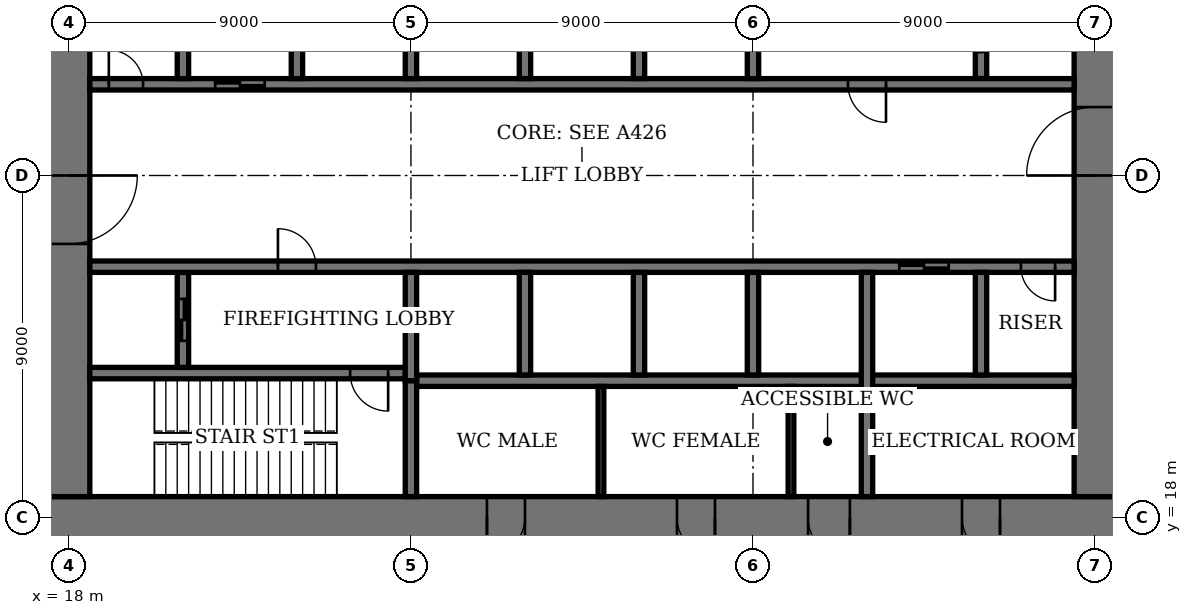
"""IFC4 building model, lengths in metres.
Left out: names, types, materials, properties, quantities, classifications, styles, units other than length and angle.
Written with IfcOpenShell. Run it as: python <this file> out.ifc"""

import sys

from ifc_helpers import new_model, si_unit, direction, frame, frame_2d, origin, place, context, subcontext, project, spatial, rectangle, extrude, element, fill, save


model = new_model("IFC4")
c1 = context("Model", 3, precision=1e-05, world=origin(), true_north=direction((0.0, 1.0)))
c2 = subcontext(c1, "Body", "Model", "MODEL_VIEW")
j1 = project(units=[si_unit("LENGTHUNIT", "METRE"), si_unit("PLANEANGLEUNIT", "RADIAN")], contexts=[c1])
p1 = place(None, origin())
s1 = spatial("IfcSite", under=j1, at=p1, CompositionType="ELEMENT")
p2 = place(p1, origin())
s2 = spatial("IfcBuilding", under=s1, at=p2, CompositionType="ELEMENT")
p3 = place(p2, frame((0.0, 0.0, 80.0)))
s3 = spatial("IfcBuildingStorey", under=s2, at=p3, CompositionType="ELEMENT", Elevation=80.0)
p4 = place(p3, frame((17.45, 18.0, 0.0), z_axis=(0.0, 0.0, 1.0), x_axis=(1.0, 0.0, 0.0)))
e1 = element("IfcWall", 1, at=p4, inside=s3, PredefinedType="SHEAR", context=c2, shape_type="SweptSolid", body=[
    extrude(rectangle(XDim=28.1, YDim=1.1, at=frame_2d((14.05, 0.0))), origin(), (0.0, 0.0, 1.0), 5.0),
])
p5 = place(p4, frame((11.55, 0.0, 0.0)))
e2 = element("IfcOpeningElement", 2, at=p5, cuts=e1, PredefinedType="OPENING", context=c2, shape_type="SweptSolid", body=[
    extrude(rectangle(XDim=1.0, YDim=2.4, at=frame_2d((0.5, 1.2))), frame((0.0, 0.56, 0.0), z_axis=(0.0, -1.0, 0.0), x_axis=(1.0, 0.0, 0.0)), (0.0, 0.0, 1.0), 1.12),
])
p6 = place(p4, frame((16.55, 0.0, 0.0)))
e3 = element("IfcOpeningElement", 3, at=p6, cuts=e1, PredefinedType="OPENING", context=c2, shape_type="SweptSolid", body=[
    extrude(rectangle(XDim=1.0, YDim=2.4, at=frame_2d((0.5, 1.2))), frame((0.0, 0.56, 0.0), z_axis=(0.0, -1.0, 0.0), x_axis=(1.0, 0.0, 0.0)), (0.0, 0.0, 1.0), 1.12),
])
p7 = place(p4, frame((20.0, 0.0, 0.0)))
e4 = element("IfcOpeningElement", 4, at=p7, cuts=e1, PredefinedType="OPENING", context=c2, shape_type="SweptSolid", body=[
    extrude(rectangle(XDim=1.1, YDim=2.4, at=frame_2d((0.55, 1.2))), frame((0.0, 0.56, 0.0), z_axis=(0.0, -1.0, 0.0), x_axis=(1.0, 0.0, 0.0)), (0.0, 0.0, 1.0), 1.12),
])
p8 = place(p4, frame((24.05, 0.0, 0.0)))
e5 = element("IfcOpeningElement", 5, at=p8, cuts=e1, PredefinedType="OPENING", context=c2, shape_type="SweptSolid", body=[
    extrude(rectangle(XDim=1.0, YDim=2.4, at=frame_2d((0.5, 1.2))), frame((0.0, 0.56, 0.0), z_axis=(0.0, -1.0, 0.0), x_axis=(1.0, 0.0, 0.0)), (0.0, 0.0, 1.0), 1.12),
])
p9 = place(p3, frame((18.0, 35.45, 0.0), z_axis=(0.0, 0.0, 1.0), x_axis=(0.0, -1.0, 0.0)))
e6 = element("IfcWall", 6, at=p9, inside=s3, PredefinedType="SHEAR", context=c2, shape_type="SweptSolid", body=[
    extrude(rectangle(XDim=16.9, YDim=1.1, at=frame_2d((8.45, 0.0))), origin(), (0.0, 0.0, 1.0), 5.0),
])
p10 = place(p9, frame((8.45, 0.0, 0.0)))
e7 = element("IfcOpeningElement", 7, at=p10, cuts=e6, PredefinedType="OPENING", context=c2, shape_type="SweptSolid", body=[
    extrude(rectangle(XDim=1.8, YDim=2.4, at=frame_2d((0.9, 1.2))), frame((0.0, 0.56, 0.0), z_axis=(0.0, -1.0, 0.0), x_axis=(1.0, 0.0, 0.0)), (0.0, 0.0, 1.0), 1.12),
])
p11 = place(p3, frame((45.0, 18.55, 0.0), z_axis=(0.0, 0.0, 1.0), x_axis=(0.0, 1.0, 0.0)))
e8 = element("IfcWall", 8, at=p11, inside=s3, PredefinedType="SHEAR", context=c2, shape_type="SweptSolid", body=[
    extrude(rectangle(XDim=16.9, YDim=1.1, at=frame_2d((8.45, 0.0))), origin(), (0.0, 0.0, 1.0), 5.0),
])
p12 = place(p11, frame((8.45, 0.0, 0.0)))
e9 = element("IfcOpeningElement", 9, at=p12, cuts=e8, PredefinedType="OPENING", context=c2, shape_type="SweptSolid", body=[
    extrude(rectangle(XDim=1.8, YDim=2.4, at=frame_2d((0.9, 1.2))), frame((0.0, 0.56, 0.0), z_axis=(0.0, -1.0, 0.0), x_axis=(1.0, 0.0, 0.0)), (0.0, 0.0, 1.0), 1.12),
])
p13 = place(p3, frame((18.55, 21.8, 0.0), z_axis=(0.0, 0.0, 1.0), x_axis=(1.0, 0.0, 0.0)))
e10 = element("IfcWall", 10, at=p13, inside=s3, PredefinedType="SHEAR", context=c2, shape_type="SweptSolid", body=[
    extrude(rectangle(XDim=8.3, YDim=0.3, at=frame_2d((4.15, 0.0))), origin(), (0.0, 0.0, 1.0), 5.0),
])
p14 = place(p13, frame((6.85, 0.0, 0.0)))
e11 = element("IfcOpeningElement", 11, at=p14, cuts=e10, PredefinedType="OPENING", context=c2, shape_type="SweptSolid", body=[
    extrude(rectangle(XDim=1.0, YDim=2.4, at=frame_2d((0.5, 1.2))), frame((0.0, 0.16, 0.0), z_axis=(0.0, -1.0, 0.0), x_axis=(1.0, 0.0, 0.0)), (0.0, 0.0, 1.0), 0.32),
])
p15 = place(p3, frame((27.0, 18.55, 0.0), z_axis=(0.0, 0.0, 1.0), x_axis=(0.0, 1.0, 0.0)))
e12 = element("IfcWall", 12, at=p15, inside=s3, PredefinedType="SHEAR", context=c2, shape_type="SweptSolid", body=[
    extrude(rectangle(XDim=3.05, YDim=0.3, at=frame_2d((1.525, 0.0))), origin(), (0.0, 0.0, 1.0), 5.0),
])
p16 = place(p3, frame((21.0, 21.95, 0.0), z_axis=(0.0, 0.0, 1.0), x_axis=(0.0, 1.0, 0.0)))
e13 = element("IfcWall", 13, at=p16, inside=s3, PredefinedType="SHEAR", context=c2, shape_type="SweptSolid", body=[
    extrude(rectangle(XDim=2.5, YDim=0.3, at=frame_2d((1.25, 0.0))), origin(), (0.0, 0.0, 1.0), 5.0),
])
p17 = place(p16, frame((0.7, 0.0, 0.0)))
e14 = element("IfcOpeningElement", 14, at=p17, cuts=e13, PredefinedType="OPENING", context=c2, shape_type="SweptSolid", body=[
    extrude(rectangle(XDim=1.1, YDim=2.4, at=frame_2d((0.55, 1.2))), frame((0.0, 0.16, 0.0), z_axis=(0.0, -1.0, 0.0), x_axis=(1.0, 0.0, 0.0)), (0.0, 0.0, 1.0), 0.32),
])
p18 = place(p3, frame((42.0, 29.55, 0.0), z_axis=(0.0, 0.0, 1.0), x_axis=(0.0, 1.0, 0.0)))
e15 = element("IfcWall", 15, at=p18, inside=s3, PredefinedType="SHEAR", context=c2, shape_type="SweptSolid", body=[
    extrude(rectangle(XDim=2.5, YDim=0.3, at=frame_2d((1.25, 0.0))), origin(), (0.0, 0.0, 1.0), 5.0),
])
p19 = place(p18, frame((0.7, 0.0, 0.0)))
e16 = element("IfcOpeningElement", 16, at=p19, cuts=e15, PredefinedType="OPENING", context=c2, shape_type="SweptSolid", body=[
    extrude(rectangle(XDim=1.1, YDim=2.4, at=frame_2d((0.55, 1.2))), frame((0.0, 0.16, 0.0), z_axis=(0.0, -1.0, 0.0), x_axis=(1.0, 0.0, 0.0)), (0.0, 0.0, 1.0), 0.32),
])
p20 = place(p3, frame((18.55, 24.6, 0.0), z_axis=(0.0, 0.0, 1.0), x_axis=(1.0, 0.0, 0.0)))
e17 = element("IfcWall", 17, at=p20, inside=s3, PredefinedType="SHEAR", context=c2, shape_type="SweptSolid", body=[
    extrude(rectangle(XDim=25.9, YDim=0.3, at=frame_2d((12.95, 0.0))), origin(), (0.0, 0.0, 1.0), 5.0),
])
p21 = place(p20, frame((4.95, 0.0, 0.0)))
e18 = element("IfcOpeningElement", 18, at=p21, cuts=e17, PredefinedType="OPENING", context=c2, shape_type="SweptSolid", body=[
    extrude(rectangle(XDim=1.0, YDim=2.4, at=frame_2d((0.5, 1.2))), frame((0.0, 0.16, 0.0), z_axis=(0.0, -1.0, 0.0), x_axis=(1.0, 0.0, 0.0)), (0.0, 0.0, 1.0), 0.32),
])
p22 = place(p20, frame((24.5, 0.0, 0.0)))
e19 = element("IfcOpeningElement", 19, at=p22, cuts=e17, PredefinedType="OPENING", context=c2, shape_type="SweptSolid", body=[
    extrude(rectangle(XDim=0.9, YDim=2.1, at=frame_2d((0.45, 1.05))), frame((0.0, 0.16, 0.0), z_axis=(0.0, -1.0, 0.0), x_axis=(1.0, 0.0, 0.0)), (0.0, 0.0, 1.0), 0.32),
])
p23 = place(p20, frame((21.3, 0.0, 0.0)))
e20 = element("IfcOpeningElement", 20, at=p23, cuts=e17, PredefinedType="OPENING", context=c2, shape_type="SweptSolid", body=[
    extrude(rectangle(XDim=1.3, YDim=2.4, at=frame_2d((0.65, 1.2))), frame((0.0, 0.16, 0.0), z_axis=(0.0, -1.0, 0.0), x_axis=(1.0, 0.0, 0.0)), (0.0, 0.0, 1.0), 0.32),
])
p24 = place(p3, frame((18.55, 29.4, 0.0), z_axis=(0.0, 0.0, 1.0), x_axis=(1.0, 0.0, 0.0)))
e21 = element("IfcWall", 21, at=p24, inside=s3, PredefinedType="SHEAR", context=c2, shape_type="SweptSolid", body=[
    extrude(rectangle(XDim=25.9, YDim=0.3, at=frame_2d((12.95, 0.0))), origin(), (0.0, 0.0, 1.0), 5.0),
])
p25 = place(p24, frame((19.95, 0.0, 0.0)))
e22 = element("IfcOpeningElement", 22, at=p25, cuts=e21, PredefinedType="OPENING", context=c2, shape_type="SweptSolid", body=[
    extrude(rectangle(XDim=1.0, YDim=2.4, at=frame_2d((0.5, 1.2))), frame((0.0, 0.16, 0.0), z_axis=(0.0, -1.0, 0.0), x_axis=(1.0, 0.0, 0.0)), (0.0, 0.0, 1.0), 0.32),
])
p26 = place(p24, frame((0.5, 0.0, 0.0)))
e23 = element("IfcOpeningElement", 23, at=p26, cuts=e21, PredefinedType="OPENING", context=c2, shape_type="SweptSolid", body=[
    extrude(rectangle(XDim=0.9, YDim=2.1, at=frame_2d((0.45, 1.05))), frame((0.0, 0.16, 0.0), z_axis=(0.0, -1.0, 0.0), x_axis=(1.0, 0.0, 0.0)), (0.0, 0.0, 1.0), 0.32),
])
p27 = place(p24, frame((3.3, 0.0, 0.0)))
e24 = element("IfcOpeningElement", 24, at=p27, cuts=e21, PredefinedType="OPENING", context=c2, shape_type="SweptSolid", body=[
    extrude(rectangle(XDim=1.3, YDim=2.4, at=frame_2d((0.65, 1.2))), frame((0.0, 0.16, 0.0), z_axis=(0.0, -1.0, 0.0), x_axis=(1.0, 0.0, 0.0)), (0.0, 0.0, 1.0), 0.32),
])
p28 = place(p3, frame((27.15, 21.6, 0.0), z_axis=(0.0, 0.0, 1.0), x_axis=(1.0, 0.0, 0.0)))
e25 = element("IfcWall", 25, at=p28, inside=s3, PredefinedType="SHEAR", context=c2, shape_type="SweptSolid", body=[
    extrude(rectangle(XDim=17.3, YDim=0.3, at=frame_2d((8.65, 0.0))), origin(), (0.0, 0.0, 1.0), 5.0),
])
for number, where, z_axis, x_axis in (
    (26, (30.0, 21.75, 0.0), (0.0, 0.0, 1.0), (0.0, 1.0, 0.0)),
    (27, (33.0, 29.55, 0.0), (0.0, 0.0, 1.0), (0.0, 1.0, 0.0)),
    (28, (33.0, 21.75, 0.0), (0.0, 0.0, 1.0), (0.0, 1.0, 0.0)),
    (29, (30.0, 29.55, 0.0), (0.0, 0.0, 1.0), (0.0, 1.0, 0.0)),
    (30, (36.0, 21.75, 0.0), (0.0, 0.0, 1.0), (0.0, 1.0, 0.0)),
    (31, (27.0, 29.55, 0.0), (0.0, 0.0, 1.0), (0.0, 1.0, 0.0)),
):
    element("IfcWall", number, at=place(p3, frame(where, z_axis=z_axis, x_axis=x_axis)), inside=s3, PredefinedType="SHEAR", context=c2, shape_type="SweptSolid", body=[
        extrude(rectangle(XDim=2.7, YDim=0.3, at=frame_2d((1.35, 0.0))), origin(), (0.0, 0.0, 1.0), 5.0),
    ])
for number, where, z_axis, x_axis in (
    (32, (39.0, 18.55, 0.0), (0.0, 0.0, 1.0), (0.0, 1.0, 0.0)),
    (33, (24.0, 29.55, 0.0), (0.0, 0.0, 1.0), (0.0, 1.0, 0.0)),
):
    element("IfcWall", number, at=place(p3, frame(where, z_axis=z_axis, x_axis=x_axis)), inside=s3, PredefinedType="SHEAR", context=c2, shape_type="SweptSolid", body=[
        extrude(rectangle(XDim=5.9, YDim=0.3, at=frame_2d((2.95, 0.0))), origin(), (0.0, 0.0, 1.0), 5.0),
    ])
for number, where, z_axis, x_axis in (
    (34, (42.0, 21.75, 0.0), (0.0, 0.0, 1.0), (0.0, 1.0, 0.0)),
    (35, (21.0, 29.55, 0.0), (0.0, 0.0, 1.0), (0.0, 1.0, 0.0)),
):
    element("IfcWall", number, at=place(p3, frame(where, z_axis=z_axis, x_axis=x_axis)), inside=s3, PredefinedType="SHEAR", context=c2, shape_type="SweptSolid", body=[
        extrude(rectangle(XDim=2.7, YDim=0.3, at=frame_2d((1.35, 0.0))), origin(), (0.0, 0.0, 1.0), 5.0),
    ])
for number, where, z_axis, x_axis in (
    (36, (27.0, 21.6, 0.0), (0.0, 0.0, 1.0), (0.0, 1.0, 0.0)),
    (37, (36.0, 29.55, 0.0), (0.0, 0.0, 1.0), (0.0, 1.0, 0.0)),
):
    element("IfcWall", number, at=place(p3, frame(where, z_axis=z_axis, x_axis=x_axis)), inside=s3, PredefinedType="SHEAR", context=c2, shape_type="SweptSolid", body=[
        extrude(rectangle(XDim=2.85, YDim=0.3, at=frame_2d((1.425, 0.0))), origin(), (0.0, 0.0, 1.0), 5.0),
    ])
for number, where, z_axis, x_axis in (
    (38, (32.0, 18.55, 0.0), (0.0, 0.0, 1.0), (0.0, 1.0, 0.0)),
    (39, (37.0, 18.55, 0.0), (0.0, 0.0, 1.0), (0.0, 1.0, 0.0)),
):
    element("IfcWall", number, at=place(p3, frame(where, z_axis=z_axis, x_axis=x_axis)), inside=s3, PredefinedType="PARTITIONING", context=c2, shape_type="SweptSolid", body=[
        extrude(rectangle(XDim=2.9, YDim=0.15, at=frame_2d((1.45, 0.0))), origin(), (0.0, 0.0, 1.0), 4.6),
    ])
p29 = place(p10, origin())
e40 = element("IfcDoor", 40, at=p29, inside=s3, OperationType="DOUBLE_DOOR_DOUBLE_SWING", PredefinedType="DOOR", context=c2, shape_type="SweptSolid", body=[
    extrude(rectangle(XDim=1.8, YDim=2.4, at=frame_2d((0.9, 1.2))), frame((0.0, 0.03, 0.0), z_axis=(0.0, -1.0, 0.0), x_axis=(1.0, 0.0, 0.0)), (0.0, 0.0, 1.0), 0.06),
    extrude(rectangle(XDim=0.04, YDim=2.4, at=frame_2d((0.02, 1.2))), frame((0.0, 0.55, 0.0), z_axis=(0.0, -1.0, 0.0), x_axis=(1.0, 0.0, 0.0)), (0.0, 0.0, 1.0), 1.1),
    extrude(rectangle(XDim=0.04, YDim=2.4, at=frame_2d((1.78, 1.2))), frame((0.0, 0.55, 0.0), z_axis=(0.0, -1.0, 0.0), x_axis=(1.0, 0.0, 0.0)), (0.0, 0.0, 1.0), 1.1),
    extrude(rectangle(XDim=1.8, YDim=0.04, at=frame_2d((0.9, 2.38))), frame((0.0, 0.55, 0.0), z_axis=(0.0, -1.0, 0.0), x_axis=(1.0, 0.0, 0.0)), (0.0, 0.0, 1.0), 1.1),
])
fill(e7, e40)
p30 = place(p12, origin())
e41 = element("IfcDoor", 41, at=p30, inside=s3, OperationType="DOUBLE_DOOR_DOUBLE_SWING", PredefinedType="DOOR", context=c2, shape_type="SweptSolid", body=[
    extrude(rectangle(XDim=1.8, YDim=2.4, at=frame_2d((0.9, 1.2))), frame((0.0, 0.03, 0.0), z_axis=(0.0, -1.0, 0.0), x_axis=(1.0, 0.0, 0.0)), (0.0, 0.0, 1.0), 0.06),
    extrude(rectangle(XDim=0.04, YDim=2.4, at=frame_2d((0.02, 1.2))), frame((0.0, 0.55, 0.0), z_axis=(0.0, -1.0, 0.0), x_axis=(1.0, 0.0, 0.0)), (0.0, 0.0, 1.0), 1.1),
    extrude(rectangle(XDim=0.04, YDim=2.4, at=frame_2d((1.78, 1.2))), frame((0.0, 0.55, 0.0), z_axis=(0.0, -1.0, 0.0), x_axis=(1.0, 0.0, 0.0)), (0.0, 0.0, 1.0), 1.1),
    extrude(rectangle(XDim=1.8, YDim=0.04, at=frame_2d((0.9, 2.38))), frame((0.0, 0.55, 0.0), z_axis=(0.0, -1.0, 0.0), x_axis=(1.0, 0.0, 0.0)), (0.0, 0.0, 1.0), 1.1),
])
fill(e9, e41)
p31 = place(p5, origin())
e42 = element("IfcDoor", 42, at=p31, inside=s3, OperationType="SINGLE_SWING_LEFT", PredefinedType="DOOR", context=c2, shape_type="SweptSolid", body=[
    extrude(rectangle(XDim=1.0, YDim=2.4, at=frame_2d((0.5, 1.2))), frame((0.0, 0.025, 0.0), z_axis=(0.0, -1.0, 0.0), x_axis=(1.0, 0.0, 0.0)), (0.0, 0.0, 1.0), 0.05),
    extrude(rectangle(XDim=0.04, YDim=2.4, at=frame_2d((0.02, 1.2))), frame((0.0, 0.4, 0.0), z_axis=(0.0, -1.0, 0.0), x_axis=(1.0, 0.0, 0.0)), (0.0, 0.0, 1.0), 0.8),
    extrude(rectangle(XDim=0.04, YDim=2.4, at=frame_2d((0.98, 1.2))), frame((0.0, 0.4, 0.0), z_axis=(0.0, -1.0, 0.0), x_axis=(1.0, 0.0, 0.0)), (0.0, 0.0, 1.0), 0.8),
    extrude(rectangle(XDim=1.0, YDim=0.04, at=frame_2d((0.5, 2.38))), frame((0.0, 0.4, 0.0), z_axis=(0.0, -1.0, 0.0), x_axis=(1.0, 0.0, 0.0)), (0.0, 0.0, 1.0), 0.8),
])
fill(e2, e42)
p32 = place(p6, origin())
e43 = element("IfcDoor", 43, at=p32, inside=s3, OperationType="SINGLE_SWING_RIGHT", PredefinedType="DOOR", context=c2, shape_type="SweptSolid", body=[
    extrude(rectangle(XDim=1.0, YDim=2.4, at=frame_2d((0.5, 1.2))), frame((0.0, 0.025, 0.0), z_axis=(0.0, -1.0, 0.0), x_axis=(1.0, 0.0, 0.0)), (0.0, 0.0, 1.0), 0.05),
    extrude(rectangle(XDim=0.04, YDim=2.4, at=frame_2d((0.02, 1.2))), frame((0.0, 0.4, 0.0), z_axis=(0.0, -1.0, 0.0), x_axis=(1.0, 0.0, 0.0)), (0.0, 0.0, 1.0), 0.8),
    extrude(rectangle(XDim=0.04, YDim=2.4, at=frame_2d((0.98, 1.2))), frame((0.0, 0.4, 0.0), z_axis=(0.0, -1.0, 0.0), x_axis=(1.0, 0.0, 0.0)), (0.0, 0.0, 1.0), 0.8),
    extrude(rectangle(XDim=1.0, YDim=0.04, at=frame_2d((0.5, 2.38))), frame((0.0, 0.4, 0.0), z_axis=(0.0, -1.0, 0.0), x_axis=(1.0, 0.0, 0.0)), (0.0, 0.0, 1.0), 0.8),
])
fill(e3, e43)
p33 = place(p7, origin())
e44 = element("IfcDoor", 44, at=p33, inside=s3, OperationType="SINGLE_SWING_RIGHT", PredefinedType="DOOR", context=c2, shape_type="SweptSolid", body=[
    extrude(rectangle(XDim=1.1, YDim=2.4, at=frame_2d((0.55, 1.2))), frame((0.0, 0.025, 0.0), z_axis=(0.0, -1.0, 0.0), x_axis=(1.0, 0.0, 0.0)), (0.0, 0.0, 1.0), 0.05),
    extrude(rectangle(XDim=0.04, YDim=2.4, at=frame_2d((0.02, 1.2))), frame((0.0, 0.44, 0.0), z_axis=(0.0, -1.0, 0.0), x_axis=(1.0, 0.0, 0.0)), (0.0, 0.0, 1.0), 0.88),
    extrude(rectangle(XDim=0.04, YDim=2.4, at=frame_2d((1.08, 1.2))), frame((0.0, 0.44, 0.0), z_axis=(0.0, -1.0, 0.0), x_axis=(1.0, 0.0, 0.0)), (0.0, 0.0, 1.0), 0.88),
    extrude(rectangle(XDim=1.1, YDim=0.04, at=frame_2d((0.55, 2.38))), frame((0.0, 0.44, 0.0), z_axis=(0.0, -1.0, 0.0), x_axis=(1.0, 0.0, 0.0)), (0.0, 0.0, 1.0), 0.88),
])
fill(e4, e44)
p34 = place(p8, origin())
e45 = element("IfcDoor", 45, at=p34, inside=s3, OperationType="SINGLE_SWING_RIGHT", PredefinedType="DOOR", context=c2, shape_type="SweptSolid", body=[
    extrude(rectangle(XDim=1.0, YDim=2.4, at=frame_2d((0.5, 1.2))), frame((0.0, 0.025, 0.0), z_axis=(0.0, -1.0, 0.0), x_axis=(1.0, 0.0, 0.0)), (0.0, 0.0, 1.0), 0.05),
    extrude(rectangle(XDim=0.04, YDim=2.4, at=frame_2d((0.02, 1.2))), frame((0.0, 0.4, 0.0), z_axis=(0.0, -1.0, 0.0), x_axis=(1.0, 0.0, 0.0)), (0.0, 0.0, 1.0), 0.8),
    extrude(rectangle(XDim=0.04, YDim=2.4, at=frame_2d((0.98, 1.2))), frame((0.0, 0.4, 0.0), z_axis=(0.0, -1.0, 0.0), x_axis=(1.0, 0.0, 0.0)), (0.0, 0.0, 1.0), 0.8),
    extrude(rectangle(XDim=1.0, YDim=0.04, at=frame_2d((0.5, 2.38))), frame((0.0, 0.4, 0.0), z_axis=(0.0, -1.0, 0.0), x_axis=(1.0, 0.0, 0.0)), (0.0, 0.0, 1.0), 0.8),
])
fill(e5, e45)
p35 = place(p14, origin())
e46 = element("IfcDoor", 46, at=p35, inside=s3, OperationType="SINGLE_SWING_RIGHT", PredefinedType="DOOR", context=c2, shape_type="SweptSolid", body=[
    extrude(rectangle(XDim=1.0, YDim=2.4, at=frame_2d((0.5, 1.2))), frame((0.0, 0.03, 0.0), z_axis=(0.0, -1.0, 0.0), x_axis=(1.0, 0.0, 0.0)), (0.0, 0.0, 1.0), 0.06),
])
fill(e11, e46)
p36 = place(p21, origin())
e47 = element("IfcDoor", 47, at=p36, inside=s3, OperationType="SINGLE_SWING_RIGHT", PredefinedType="DOOR", context=c2, shape_type="SweptSolid", body=[
    extrude(rectangle(XDim=1.0, YDim=2.4, at=frame_2d((0.5, 1.2))), frame((0.0, 0.03, 0.0), z_axis=(0.0, -1.0, 0.0), x_axis=(1.0, 0.0, 0.0)), (0.0, 0.0, 1.0), 0.06),
])
fill(e18, e47)
p37 = place(p25, origin())
e48 = element("IfcDoor", 48, at=p37, inside=s3, OperationType="SINGLE_SWING_RIGHT", PredefinedType="DOOR", context=c2, shape_type="SweptSolid", body=[
    extrude(rectangle(XDim=1.0, YDim=2.4, at=frame_2d((0.5, 1.2))), frame((0.0, 0.03, 0.0), z_axis=(0.0, -1.0, 0.0), x_axis=(1.0, 0.0, 0.0)), (0.0, 0.0, 1.0), 0.06),
])
fill(e22, e48)
p38 = place(p22, origin())
e49 = element("IfcDoor", 49, at=p38, inside=s3, OperationType="SINGLE_SWING_RIGHT", PredefinedType="DOOR", context=c2, shape_type="SweptSolid", body=[
    extrude(rectangle(XDim=0.9, YDim=2.1, at=frame_2d((0.45, 1.05))), frame((0.0, 0.03, 0.0), z_axis=(0.0, -1.0, 0.0), x_axis=(1.0, 0.0, 0.0)), (0.0, 0.0, 1.0), 0.06),
])
fill(e19, e49)
p39 = place(p26, origin())
e50 = element("IfcDoor", 50, at=p39, inside=s3, OperationType="SINGLE_SWING_RIGHT", PredefinedType="DOOR", context=c2, shape_type="SweptSolid", body=[
    extrude(rectangle(XDim=0.9, YDim=2.1, at=frame_2d((0.45, 1.05))), frame((0.0, 0.03, 0.0), z_axis=(0.0, -1.0, 0.0), x_axis=(1.0, 0.0, 0.0)), (0.0, 0.0, 1.0), 0.06),
])
fill(e23, e50)
p40 = place(p23, origin())
e51 = element("IfcDoor", 51, at=p40, inside=s3, OperationType="DOUBLE_DOOR_SLIDING", PredefinedType="DOOR", context=c2, shape_type="SweptSolid", body=[
    extrude(rectangle(XDim=1.3, YDim=2.4, at=frame_2d((0.65, 1.2))), frame((0.0, 0.02, 0.0), z_axis=(0.0, -1.0, 0.0), x_axis=(1.0, 0.0, 0.0)), (0.0, 0.0, 1.0), 0.04),
])
fill(e20, e51)
p41 = place(p27, origin())
e52 = element("IfcDoor", 52, at=p41, inside=s3, OperationType="DOUBLE_DOOR_SLIDING", PredefinedType="DOOR", context=c2, shape_type="SweptSolid", body=[
    extrude(rectangle(XDim=1.3, YDim=2.4, at=frame_2d((0.65, 1.2))), frame((0.0, 0.02, 0.0), z_axis=(0.0, -1.0, 0.0), x_axis=(1.0, 0.0, 0.0)), (0.0, 0.0, 1.0), 0.04),
])
fill(e24, e52)
p42 = place(p17, origin())
e53 = element("IfcDoor", 53, at=p42, inside=s3, OperationType="DOUBLE_DOOR_SLIDING", PredefinedType="DOOR", context=c2, shape_type="SweptSolid", body=[
    extrude(rectangle(XDim=1.1, YDim=2.4, at=frame_2d((0.55, 1.2))), frame((0.0, 0.03, 0.0), z_axis=(0.0, -1.0, 0.0), x_axis=(1.0, 0.0, 0.0)), (0.0, 0.0, 1.0), 0.06),
])
fill(e14, e53)
save(model, sys.argv[1])
